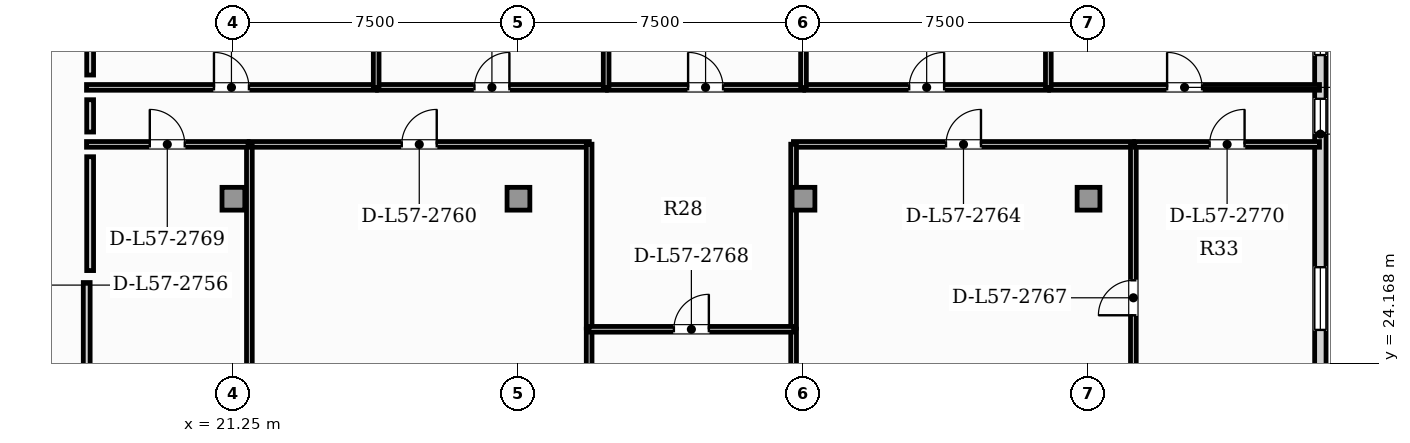
"""IFC4 building model, lengths in metres.
Left out: names, types, materials, properties, quantities, classifications, styles, units other than length and angle.
Written with IfcOpenShell. Run it as: python <this file> out.ifc"""

import sys

from ifc_helpers import new_model, si_unit, direction, frame, frame_2d, origin, origin_2d, place, context, subcontext, project, spatial, rectangle, extrude, element, fill, save


model = new_model("IFC4")
c1 = context("Model", 3, precision=1e-05, world=origin(), true_north=direction((0.0, 1.0)))
c2 = subcontext(c1, "Body", "Model", "MODEL_VIEW")
j1 = project(units=[si_unit("LENGTHUNIT", "METRE"), si_unit("PLANEANGLEUNIT", "RADIAN")], contexts=[c1])
p1 = place(None, origin())
s1 = spatial("IfcSite", under=j1, at=p1, CompositionType="ELEMENT")
p2 = place(p1, origin())
s2 = spatial("IfcBuilding", under=s1, at=p2, CompositionType="ELEMENT")
p3 = place(p2, frame((0.0, 0.0, 231.1)))
s3 = spatial("IfcBuildingStorey", under=s2, at=p3, CompositionType="ELEMENT", Elevation=231.1)
for number, where, z_axis, x_axis in (
    (1, (21.25, 28.5, 0.0), (0.0, 0.0, 1.0), (1.0, 0.0, 0.0)),
    (2, (28.75, 28.5, 0.0), (0.0, 0.0, 1.0), (1.0, 0.0, 0.0)),
    (3, (36.25, 28.5, 0.0), (0.0, 0.0, 1.0), (1.0, 0.0, 0.0)),
    (4, (43.75, 28.5, 0.0), (0.0, 0.0, 1.0), (1.0, 0.0, 0.0)),
):
    element("IfcColumn", number, at=place(p3, frame(where, z_axis=z_axis, x_axis=x_axis)), inside=s3, PredefinedType="COLUMN", context=c2, shape_type="SweptSolid", body=[
        extrude(rectangle(XDim=0.6, YDim=0.6, at=origin_2d()), origin(), (0.0, 0.0, 1.0), 3.85),
    ])
p4 = place(p3, frame((49.85, 3.24, 0.0), z_axis=(0.0, 0.0, 1.0), x_axis=(0.0, 1.0, 0.0)))
e5 = element("IfcWall", 5, at=p4, inside=s3, PredefinedType="SOLIDWALL", context=c2, shape_type="SweptSolid", body=[
    extrude(rectangle(XDim=30.72, YDim=0.3, at=frame_2d((15.36, 0.0))), origin(), (0.0, 0.0, 1.0), 3.63),
])
p5 = place(p4, frame((26.99, 0.0, 0.95)))
e6 = element("IfcOpeningElement", 6, at=p5, cuts=e5, PredefinedType="OPENING", context=c2, shape_type="SweptSolid", body=[
    extrude(rectangle(XDim=0.9, YDim=1.5, at=frame_2d((0.45, 0.75))), frame((0.0, 0.16, 0.0), z_axis=(0.0, -1.0, 0.0), x_axis=(1.0, 0.0, 0.0)), (0.0, 0.0, 1.0), 0.32),
])
p6 = place(p4, frame((10.966, 0.0, 0.88)))
e7 = element("IfcOpeningElement", 7, at=p6, cuts=e5, PredefinedType="OPENING", context=c2, shape_type="SweptSolid", body=[
    extrude(rectangle(XDim=1.65, YDim=2.0, at=frame_2d((0.825, 1.0))), frame((0.0, 0.16, 0.0), z_axis=(0.0, -1.0, 0.0), x_axis=(1.0, 0.0, 0.0)), (0.0, 0.0, 1.0), 0.32),
])
p7 = place(p4, frame((14.99, 0.0, 0.88)))
e8 = element("IfcOpeningElement", 8, at=p7, cuts=e5, PredefinedType="OPENING", context=c2, shape_type="SweptSolid", body=[
    extrude(rectangle(XDim=1.65, YDim=2.0, at=frame_2d((0.825, 1.0))), frame((0.0, 0.16, 0.0), z_axis=(0.0, -1.0, 0.0), x_axis=(1.0, 0.0, 0.0)), (0.0, 0.0, 1.0), 0.32),
])
p8 = place(p4, frame((21.809, 0.0, 0.88)))
e9 = element("IfcOpeningElement", 9, at=p8, cuts=e5, PredefinedType="OPENING", context=c2, shape_type="SweptSolid", body=[
    extrude(rectangle(XDim=1.65, YDim=2.0, at=frame_2d((0.825, 1.0))), frame((0.0, 0.16, 0.0), z_axis=(0.0, -1.0, 0.0), x_axis=(1.0, 0.0, 0.0)), (0.0, 0.0, 1.0), 0.32),
])
p9 = place(p4, frame((29.04, 0.0, 0.95)))
e10 = element("IfcOpeningElement", 10, at=p9, cuts=e5, PredefinedType="OPENING", context=c2, shape_type="SweptSolid", body=[
    extrude(rectangle(XDim=0.9, YDim=1.5, at=frame_2d((0.45, 0.75))), frame((0.0, 0.16, 0.0), z_axis=(0.0, -1.0, 0.0), x_axis=(1.0, 0.0, 0.0)), (0.0, 0.0, 1.0), 0.32),
])
p10 = place(p3, frame((17.39, 15.635, 0.0), z_axis=(0.0, 0.0, 1.0), x_axis=(0.0, 1.0, 0.0)))
e11 = element("IfcWall", 11, at=p10, inside=s3, PredefinedType="PARTITIONING", context=c2, shape_type="SweptSolid", body=[
    extrude(rectangle(XDim=10.66, YDim=0.18, at=frame_2d((5.33, 0.0))), origin(), (0.0, 0.0, 1.0), 3.63),
])
p11 = place(p3, frame((30.61, 13.765, 0.0), z_axis=(0.0, 0.0, 1.0), x_axis=(0.0, 1.0, 0.0)))
e12 = element("IfcWall", 12, at=p11, inside=s3, PredefinedType="PARTITIONING", context=c2, shape_type="SweptSolid", body=[
    extrude(rectangle(XDim=11.305, YDim=0.15, at=frame_2d((5.652, 0.0))), origin(), (0.0, 0.0, 1.0), 3.63),
])
p12 = place(p11, frame((5.192, 0.0, 0.0)))
e13 = element("IfcOpeningElement", 13, at=p12, cuts=e12, PredefinedType="OPENING", context=c2, shape_type="SweptSolid", body=[
    extrude(rectangle(XDim=0.92, YDim=2.1, at=frame_2d((0.46, 1.05))), frame((0.0, 0.085, 0.0), z_axis=(0.0, -1.0, 0.0), x_axis=(1.0, 0.0, 0.0)), (0.0, 0.0, 1.0), 0.17),
])
p13 = place(p3, frame((21.665, 29.93, 0.0), z_axis=(0.0, 0.0, 1.0), x_axis=(1.0, 0.0, 0.0)))
e14 = element("IfcWall", 14, at=p13, inside=s3, PredefinedType="PARTITIONING", context=c2, shape_type="SweptSolid", body=[
    extrude(rectangle(XDim=8.95, YDim=0.15, at=frame_2d((4.475, 0.0))), origin(), (0.0, 0.0, 1.0), 3.63),
])
p14 = place(p13, frame((4.015, 0.0, 0.0)))
e15 = element("IfcOpeningElement", 15, at=p14, cuts=e14, PredefinedType="OPENING", context=c2, shape_type="SweptSolid", body=[
    extrude(rectangle(XDim=0.92, YDim=2.1, at=frame_2d((0.46, 1.05))), frame((0.0, 0.085, 0.0), z_axis=(0.0, -1.0, 0.0), x_axis=(1.0, 0.0, 0.0)), (0.0, 0.0, 1.0), 0.17),
])
p15 = place(p3, frame((30.61, 25.1, 0.0), z_axis=(0.0, 0.0, 1.0), x_axis=(0.0, 1.0, 0.0)))
e16 = element("IfcWall", 16, at=p15, inside=s3, PredefinedType="PARTITIONING", context=c2, shape_type="SweptSolid", body=[
    extrude(rectangle(XDim=4.835, YDim=0.15, at=frame_2d((2.417, 0.0))), origin(), (0.0, 0.0, 1.0), 3.63),
])
p16 = place(p3, frame((21.67, 15.635, 0.0), z_axis=(0.0, 0.0, 1.0), x_axis=(0.0, 1.0, 0.0)))
e17 = element("IfcWall", 17, at=p16, inside=s3, PredefinedType="PARTITIONING", context=c2, shape_type="SweptSolid", body=[
    extrude(rectangle(XDim=14.3, YDim=0.15, at=frame_2d((7.15, 0.0))), origin(), (0.0, 0.0, 1.0), 3.63),
])
p17 = place(p16, frame((4.545, 0.0, 0.0)))
e18 = element("IfcOpeningElement", 18, at=p17, cuts=e17, PredefinedType="OPENING", context=c2, shape_type="SweptSolid", body=[
    extrude(rectangle(XDim=0.92, YDim=2.1, at=frame_2d((0.46, 1.05))), frame((0.0, 0.085, 0.0), z_axis=(0.0, -1.0, 0.0), x_axis=(1.0, 0.0, 0.0)), (0.0, 0.0, 1.0), 0.17),
])
p18 = place(p3, frame((35.99, 13.765, 0.0), z_axis=(0.0, 0.0, 1.0), x_axis=(0.0, 1.0, 0.0)))
e19 = element("IfcWall", 19, at=p18, inside=s3, PredefinedType="PARTITIONING", context=c2, shape_type="SweptSolid", body=[
    extrude(rectangle(XDim=11.305, YDim=0.15, at=frame_2d((5.652, 0.0))), origin(), (0.0, 0.0, 1.0), 3.63),
])
p19 = place(p18, frame((5.192, 0.0, 0.0)))
e20 = element("IfcOpeningElement", 20, at=p19, cuts=e19, PredefinedType="OPENING", context=c2, shape_type="SweptSolid", body=[
    extrude(rectangle(XDim=0.92, YDim=2.1, at=frame_2d((0.46, 1.05))), frame((0.0, 0.085, 0.0), z_axis=(0.0, -1.0, 0.0), x_axis=(1.0, 0.0, 0.0)), (0.0, 0.0, 1.0), 0.17),
])
p20 = place(p3, frame((35.985, 29.93, 0.0), z_axis=(0.0, 0.0, 1.0), x_axis=(1.0, 0.0, 0.0)))
e21 = element("IfcWall", 21, at=p20, inside=s3, PredefinedType="PARTITIONING", context=c2, shape_type="SweptSolid", body=[
    extrude(rectangle(XDim=8.95, YDim=0.15, at=frame_2d((4.475, 0.0))), origin(), (0.0, 0.0, 1.0), 3.63),
])
p21 = place(p20, frame((4.015, 0.0, 0.0)))
e22 = element("IfcOpeningElement", 22, at=p21, cuts=e21, PredefinedType="OPENING", context=c2, shape_type="SweptSolid", body=[
    extrude(rectangle(XDim=0.92, YDim=2.1, at=frame_2d((0.46, 1.05))), frame((0.0, 0.085, 0.0), z_axis=(0.0, -1.0, 0.0), x_axis=(1.0, 0.0, 0.0)), (0.0, 0.0, 1.0), 0.17),
])
p22 = place(p3, frame((35.99, 25.1, 0.0), z_axis=(0.0, 0.0, 1.0), x_axis=(0.0, 1.0, 0.0)))
e23 = element("IfcWall", 23, at=p22, inside=s3, PredefinedType="PARTITIONING", context=c2, shape_type="SweptSolid", body=[
    extrude(rectangle(XDim=4.835, YDim=0.15, at=frame_2d((2.417, 0.0))), origin(), (0.0, 0.0, 1.0), 3.63),
])
p23 = place(p3, frame((44.93, 21.853, 0.0), z_axis=(0.0, 0.0, 1.0), x_axis=(0.0, 1.0, 0.0)))
e24 = element("IfcWall", 24, at=p23, inside=s3, PredefinedType="PARTITIONING", context=c2, shape_type="SweptSolid", body=[
    extrude(rectangle(XDim=8.083, YDim=0.15, at=frame_2d((4.041, 0.0))), origin(), (0.0, 0.0, 1.0), 3.63),
])
p24 = place(p23, frame((3.581, 0.0, 0.0)))
e25 = element("IfcOpeningElement", 25, at=p24, cuts=e24, PredefinedType="OPENING", context=c2, shape_type="SweptSolid", body=[
    extrude(rectangle(XDim=0.92, YDim=2.1, at=frame_2d((0.46, 1.05))), frame((0.0, 0.085, 0.0), z_axis=(0.0, -1.0, 0.0), x_axis=(1.0, 0.0, 0.0)), (0.0, 0.0, 1.0), 0.17),
])
p25 = place(p3, frame((30.605, 25.065, 0.0), z_axis=(0.0, 0.0, 1.0), x_axis=(1.0, 0.0, 0.0)))
e26 = element("IfcWall", 26, at=p25, inside=s3, PredefinedType="PARTITIONING", context=c2, shape_type="SweptSolid", body=[
    extrude(rectangle(XDim=5.39, YDim=0.15, at=frame_2d((2.695, 0.0))), origin(), (0.0, 0.0, 1.0), 3.63),
])
p26 = place(p25, frame((2.235, 0.0, 0.0)))
e27 = element("IfcOpeningElement", 27, at=p26, cuts=e26, PredefinedType="OPENING", context=c2, shape_type="SweptSolid", body=[
    extrude(rectangle(XDim=0.92, YDim=2.1, at=frame_2d((0.46, 1.05))), frame((0.0, 0.085, 0.0), z_axis=(0.0, -1.0, 0.0), x_axis=(1.0, 0.0, 0.0)), (0.0, 0.0, 1.0), 0.17),
])
p27 = place(p3, frame((17.385, 29.93, 0.0), z_axis=(0.0, 0.0, 1.0), x_axis=(1.0, 0.0, 0.0)))
e28 = element("IfcWall", 28, at=p27, inside=s3, PredefinedType="PARTITIONING", context=c2, shape_type="SweptSolid", body=[
    extrude(rectangle(XDim=4.25, YDim=0.15, at=frame_2d((2.125, 0.0))), origin(), (0.0, 0.0, 1.0), 3.63),
])
p28 = place(p27, frame((1.665, 0.0, 0.0)))
e29 = element("IfcOpeningElement", 29, at=p28, cuts=e28, PredefinedType="OPENING", context=c2, shape_type="SweptSolid", body=[
    extrude(rectangle(XDim=0.92, YDim=2.1, at=frame_2d((0.46, 1.05))), frame((0.0, 0.085, 0.0), z_axis=(0.0, -1.0, 0.0), x_axis=(1.0, 0.0, 0.0)), (0.0, 0.0, 1.0), 0.17),
])
p29 = place(p3, frame((44.965, 29.93, 0.0), z_axis=(0.0, 0.0, 1.0), x_axis=(1.0, 0.0, 0.0)))
e30 = element("IfcWall", 30, at=p29, inside=s3, PredefinedType="PARTITIONING", context=c2, shape_type="SweptSolid", body=[
    extrude(rectangle(XDim=4.862, YDim=0.15, at=frame_2d((2.431, 0.0))), origin(), (0.0, 0.0, 1.0), 3.63),
])
p30 = place(p29, frame((1.971, 0.0, 0.0)))
e31 = element("IfcOpeningElement", 31, at=p30, cuts=e30, PredefinedType="OPENING", context=c2, shape_type="SweptSolid", body=[
    extrude(rectangle(XDim=0.92, YDim=2.1, at=frame_2d((0.46, 1.05))), frame((0.0, 0.085, 0.0), z_axis=(0.0, -1.0, 0.0), x_axis=(1.0, 0.0, 0.0)), (0.0, 0.0, 1.0), 0.17),
])
p31 = place(p3, frame((17.385, 31.43, 0.0), z_axis=(0.0, 0.0, 1.0), x_axis=(1.0, 0.0, 0.0)))
e32 = element("IfcWall", 32, at=p31, inside=s3, PredefinedType="PARTITIONING", context=c2, shape_type="SweptSolid", body=[
    extrude(rectangle(XDim=7.626, YDim=0.15, at=frame_2d((3.813, 0.0))), origin(), (0.0, 0.0, 1.0), 3.63),
])
p32 = place(p31, frame((3.353, 0.0, 0.0)))
e33 = element("IfcOpeningElement", 33, at=p32, cuts=e32, PredefinedType="OPENING", context=c2, shape_type="SweptSolid", body=[
    extrude(rectangle(XDim=0.92, YDim=2.1, at=frame_2d((0.46, 1.05))), frame((0.0, 0.085, 0.0), z_axis=(0.0, -1.0, 0.0), x_axis=(1.0, 0.0, 0.0)), (0.0, 0.0, 1.0), 0.17),
])
p33 = place(p3, frame((25.042, 31.43, 0.0), z_axis=(0.0, 0.0, 1.0), x_axis=(1.0, 0.0, 0.0)))
e34 = element("IfcWall", 34, at=p33, inside=s3, PredefinedType="PARTITIONING", context=c2, shape_type="SweptSolid", body=[
    extrude(rectangle(XDim=6.021, YDim=0.15, at=frame_2d((3.01, 0.0))), origin(), (0.0, 0.0, 1.0), 3.63),
])
p34 = place(p33, frame((2.55, 0.0, 0.0)))
e35 = element("IfcOpeningElement", 35, at=p34, cuts=e34, PredefinedType="OPENING", context=c2, shape_type="SweptSolid", body=[
    extrude(rectangle(XDim=0.92, YDim=2.1, at=frame_2d((0.46, 1.05))), frame((0.0, 0.085, 0.0), z_axis=(0.0, -1.0, 0.0), x_axis=(1.0, 0.0, 0.0)), (0.0, 0.0, 1.0), 0.17),
])
p35 = place(p3, frame((31.092, 31.43, 0.0), z_axis=(0.0, 0.0, 1.0), x_axis=(1.0, 0.0, 0.0)))
e36 = element("IfcWall", 36, at=p35, inside=s3, PredefinedType="PARTITIONING", context=c2, shape_type="SweptSolid", body=[
    extrude(rectangle(XDim=5.163, YDim=0.15, at=frame_2d((2.581, 0.0))), origin(), (0.0, 0.0, 1.0), 3.63),
])
p36 = place(p35, frame((2.121, 0.0, 0.0)))
e37 = element("IfcOpeningElement", 37, at=p36, cuts=e36, PredefinedType="OPENING", context=c2, shape_type="SweptSolid", body=[
    extrude(rectangle(XDim=0.92, YDim=2.1, at=frame_2d((0.46, 1.05))), frame((0.0, 0.085, 0.0), z_axis=(0.0, -1.0, 0.0), x_axis=(1.0, 0.0, 0.0)), (0.0, 0.0, 1.0), 0.17),
])
p37 = place(p3, frame((36.285, 31.43, 0.0), z_axis=(0.0, 0.0, 1.0), x_axis=(1.0, 0.0, 0.0)))
e38 = element("IfcWall", 38, at=p37, inside=s3, PredefinedType="PARTITIONING", context=c2, shape_type="SweptSolid", body=[
    extrude(rectangle(XDim=6.412, YDim=0.15, at=frame_2d((3.206, 0.0))), origin(), (0.0, 0.0, 1.0), 3.63),
])
p38 = place(p37, frame((2.746, 0.0, 0.0)))
e39 = element("IfcOpeningElement", 39, at=p38, cuts=e38, PredefinedType="OPENING", context=c2, shape_type="SweptSolid", body=[
    extrude(rectangle(XDim=0.92, YDim=2.1, at=frame_2d((0.46, 1.05))), frame((0.0, 0.085, 0.0), z_axis=(0.0, -1.0, 0.0), x_axis=(1.0, 0.0, 0.0)), (0.0, 0.0, 1.0), 0.17),
])
p39 = place(p3, frame((42.727, 31.43, 0.0), z_axis=(0.0, 0.0, 1.0), x_axis=(1.0, 0.0, 0.0)))
e40 = element("IfcWall", 40, at=p39, inside=s3, PredefinedType="PARTITIONING", context=c2, shape_type="SweptSolid", body=[
    extrude(rectangle(XDim=7.1, YDim=0.15, at=frame_2d((3.55, 0.0))), origin(), (0.0, 0.0, 1.0), 3.63),
])
p40 = place(p39, frame((3.09, 0.0, 0.0)))
e41 = element("IfcOpeningElement", 41, at=p40, cuts=e40, PredefinedType="OPENING", context=c2, shape_type="SweptSolid", body=[
    extrude(rectangle(XDim=0.92, YDim=2.1, at=frame_2d((0.46, 1.05))), frame((0.0, 0.085, 0.0), z_axis=(0.0, -1.0, 0.0), x_axis=(1.0, 0.0, 0.0)), (0.0, 0.0, 1.0), 0.17),
])
for number, where, z_axis, x_axis in (
    (42, (25.007, 31.425, 0.0), (0.0, 0.0, 1.0), (0.0, 1.0, 0.0)),
    (43, (31.057, 31.425, 0.0), (0.0, 0.0, 1.0), (0.0, 1.0, 0.0)),
    (44, (36.25, 31.425, 0.0), (0.0, 0.0, 1.0), (0.0, 1.0, 0.0)),
    (45, (42.692, 31.425, 0.0), (0.0, 0.0, 1.0), (0.0, 1.0, 0.0)),
):
    element("IfcWall", number, at=place(p3, frame(where, z_axis=z_axis, x_axis=x_axis)), inside=s3, PredefinedType="PARTITIONING", context=c2, shape_type="SweptSolid", body=[
        extrude(rectangle(XDim=5.603, YDim=0.15, at=frame_2d((2.801, 0.0))), origin(), (0.0, 0.0, 1.0), 3.63),
    ])
p41 = place(p3, frame((17.48, 30.255, 0.0), z_axis=(0.0, 0.0, 1.0), x_axis=(0.0, 1.0, 0.0)))
e46 = element("IfcWall", 46, at=p41, inside=s3, PredefinedType="PARTITIONING", context=c2, shape_type="SweptSolid", body=[
    extrude(rectangle(XDim=0.85, YDim=0.18, at=frame_2d((0.425, 0.0))), origin(), (0.0, 0.0, 1.0), 3.63),
])
p42 = place(p3, frame((17.48, 26.61, 0.0), z_axis=(0.0, 0.0, 1.0), x_axis=(0.0, 1.0, 0.0)))
e47 = element("IfcWall", 47, at=p42, inside=s3, PredefinedType="PARTITIONING", context=c2, shape_type="SweptSolid", body=[
    extrude(rectangle(XDim=2.995, YDim=0.18, at=frame_2d((1.498, 0.0))), origin(), (0.0, 0.0, 1.0), 3.63),
])
p43 = place(p3, frame((17.48, 31.755, 0.0), z_axis=(0.0, 0.0, 1.0), x_axis=(0.0, 1.0, 0.0)))
e48 = element("IfcWall", 48, at=p43, inside=s3, PredefinedType="PARTITIONING", context=c2, shape_type="SweptSolid", body=[
    extrude(rectangle(XDim=5.273, YDim=0.18, at=frame_2d((2.636, 0.0))), origin(), (0.0, 0.0, 1.0), 3.63),
])
p44 = place(p5, origin())
e49 = element("IfcWindow", 49, at=p44, inside=s3, PartitioningType="SINGLE_PANEL", PredefinedType="WINDOW", context=c2, shape_type="SweptSolid", body=[
    extrude(rectangle(XDim=0.9, YDim=1.5, at=frame_2d((0.45, 0.75))), frame((0.0, 0.03, 0.0), z_axis=(0.0, -1.0, 0.0), x_axis=(1.0, 0.0, 0.0)), (0.0, 0.0, 1.0), 0.06),
])
fill(e6, e49)
p45 = place(p8, origin())
e50 = element("IfcWindow", 50, at=p45, inside=s3, PartitioningType="SINGLE_PANEL", PredefinedType="WINDOW", context=c2, shape_type="SweptSolid", body=[
    extrude(rectangle(XDim=1.65, YDim=2.0, at=frame_2d((0.825, 1.0))), frame((0.0, 0.03, 0.0), z_axis=(0.0, -1.0, 0.0), x_axis=(1.0, 0.0, 0.0)), (0.0, 0.0, 1.0), 0.06),
])
fill(e9, e50)
p46 = place(p9, origin())
e51 = element("IfcWindow", 51, at=p46, inside=s3, PartitioningType="SINGLE_PANEL", PredefinedType="WINDOW", context=c2, shape_type="SweptSolid", body=[
    extrude(rectangle(XDim=0.9, YDim=1.5, at=frame_2d((0.45, 0.75))), frame((0.0, 0.03, 0.0), z_axis=(0.0, -1.0, 0.0), x_axis=(1.0, 0.0, 0.0)), (0.0, 0.0, 1.0), 0.06),
])
fill(e10, e51)
p47 = place(p14, origin())
e52 = element("IfcDoor", 52, at=p47, inside=s3, OperationType="SINGLE_SWING_RIGHT", PredefinedType="DOOR", context=c2, shape_type="SweptSolid", body=[
    extrude(rectangle(XDim=0.92, YDim=2.1, at=frame_2d((0.46, 1.05))), frame((0.0, 0.025, 0.0), z_axis=(0.0, -1.0, 0.0), x_axis=(1.0, 0.0, 0.0)), (0.0, 0.0, 1.0), 0.05),
])
fill(e15, e52)
p48 = place(p21, origin())
e53 = element("IfcDoor", 53, at=p48, inside=s3, OperationType="SINGLE_SWING_RIGHT", PredefinedType="DOOR", context=c2, shape_type="SweptSolid", body=[
    extrude(rectangle(XDim=0.92, YDim=2.1, at=frame_2d((0.46, 1.05))), frame((0.0, 0.025, 0.0), z_axis=(0.0, -1.0, 0.0), x_axis=(1.0, 0.0, 0.0)), (0.0, 0.0, 1.0), 0.05),
])
fill(e22, e53)
p49 = place(p24, origin())
e54 = element("IfcDoor", 54, at=p49, inside=s3, OperationType="SINGLE_SWING_LEFT", PredefinedType="DOOR", context=c2, shape_type="SweptSolid", body=[
    extrude(rectangle(XDim=0.92, YDim=2.1, at=frame_2d((0.46, 1.05))), frame((0.0, 0.025, 0.0), z_axis=(0.0, -1.0, 0.0), x_axis=(1.0, 0.0, 0.0)), (0.0, 0.0, 1.0), 0.05),
])
fill(e25, e54)
p50 = place(p26, origin())
e55 = element("IfcDoor", 55, at=p50, inside=s3, OperationType="SINGLE_SWING_RIGHT", PredefinedType="DOOR", context=c2, shape_type="SweptSolid", body=[
    extrude(rectangle(XDim=0.92, YDim=2.1, at=frame_2d((0.46, 1.05))), frame((0.0, 0.025, 0.0), z_axis=(0.0, -1.0, 0.0), x_axis=(1.0, 0.0, 0.0)), (0.0, 0.0, 1.0), 0.05),
])
fill(e27, e55)
p51 = place(p28, origin())
e56 = element("IfcDoor", 56, at=p51, inside=s3, OperationType="SINGLE_SWING_LEFT", PredefinedType="DOOR", context=c2, shape_type="SweptSolid", body=[
    extrude(rectangle(XDim=0.92, YDim=2.1, at=frame_2d((0.46, 1.05))), frame((0.0, 0.025, 0.0), z_axis=(0.0, -1.0, 0.0), x_axis=(1.0, 0.0, 0.0)), (0.0, 0.0, 1.0), 0.05),
])
fill(e29, e56)
p52 = place(p30, origin())
e57 = element("IfcDoor", 57, at=p52, inside=s3, OperationType="SINGLE_SWING_RIGHT", PredefinedType="DOOR", context=c2, shape_type="SweptSolid", body=[
    extrude(rectangle(XDim=0.92, YDim=2.1, at=frame_2d((0.46, 1.05))), frame((0.0, 0.025, 0.0), z_axis=(0.0, -1.0, 0.0), x_axis=(1.0, 0.0, 0.0)), (0.0, 0.0, 1.0), 0.05),
])
fill(e31, e57)
p53 = place(p32, origin())
e58 = element("IfcDoor", 58, at=p53, inside=s3, OperationType="SINGLE_SWING_LEFT", PredefinedType="DOOR", context=c2, shape_type="SweptSolid", body=[
    extrude(rectangle(XDim=0.92, YDim=2.1, at=frame_2d((0.46, 1.05))), frame((0.0, 0.025, 0.0), z_axis=(0.0, -1.0, 0.0), x_axis=(1.0, 0.0, 0.0)), (0.0, 0.0, 1.0), 0.05),
])
fill(e33, e58)
p54 = place(p34, origin())
e59 = element("IfcDoor", 59, at=p54, inside=s3, OperationType="SINGLE_SWING_RIGHT", PredefinedType="DOOR", context=c2, shape_type="SweptSolid", body=[
    extrude(rectangle(XDim=0.92, YDim=2.1, at=frame_2d((0.46, 1.05))), frame((0.0, 0.025, 0.0), z_axis=(0.0, -1.0, 0.0), x_axis=(1.0, 0.0, 0.0)), (0.0, 0.0, 1.0), 0.05),
])
fill(e35, e59)
p55 = place(p36, origin())
e60 = element("IfcDoor", 60, at=p55, inside=s3, OperationType="SINGLE_SWING_LEFT", PredefinedType="DOOR", context=c2, shape_type="SweptSolid", body=[
    extrude(rectangle(XDim=0.92, YDim=2.1, at=frame_2d((0.46, 1.05))), frame((0.0, 0.025, 0.0), z_axis=(0.0, -1.0, 0.0), x_axis=(1.0, 0.0, 0.0)), (0.0, 0.0, 1.0), 0.05),
])
fill(e37, e60)
p56 = place(p38, origin())
e61 = element("IfcDoor", 61, at=p56, inside=s3, OperationType="SINGLE_SWING_RIGHT", PredefinedType="DOOR", context=c2, shape_type="SweptSolid", body=[
    extrude(rectangle(XDim=0.92, YDim=2.1, at=frame_2d((0.46, 1.05))), frame((0.0, 0.025, 0.0), z_axis=(0.0, -1.0, 0.0), x_axis=(1.0, 0.0, 0.0)), (0.0, 0.0, 1.0), 0.05),
])
fill(e39, e61)
p57 = place(p40, origin())
e62 = element("IfcDoor", 62, at=p57, inside=s3, OperationType="SINGLE_SWING_LEFT", PredefinedType="DOOR", context=c2, shape_type="SweptSolid", body=[
    extrude(rectangle(XDim=0.92, YDim=2.1, at=frame_2d((0.46, 1.05))), frame((0.0, 0.025, 0.0), z_axis=(0.0, -1.0, 0.0), x_axis=(1.0, 0.0, 0.0)), (0.0, 0.0, 1.0), 0.05),
])
fill(e41, e62)
save(model, sys.argv[1])
